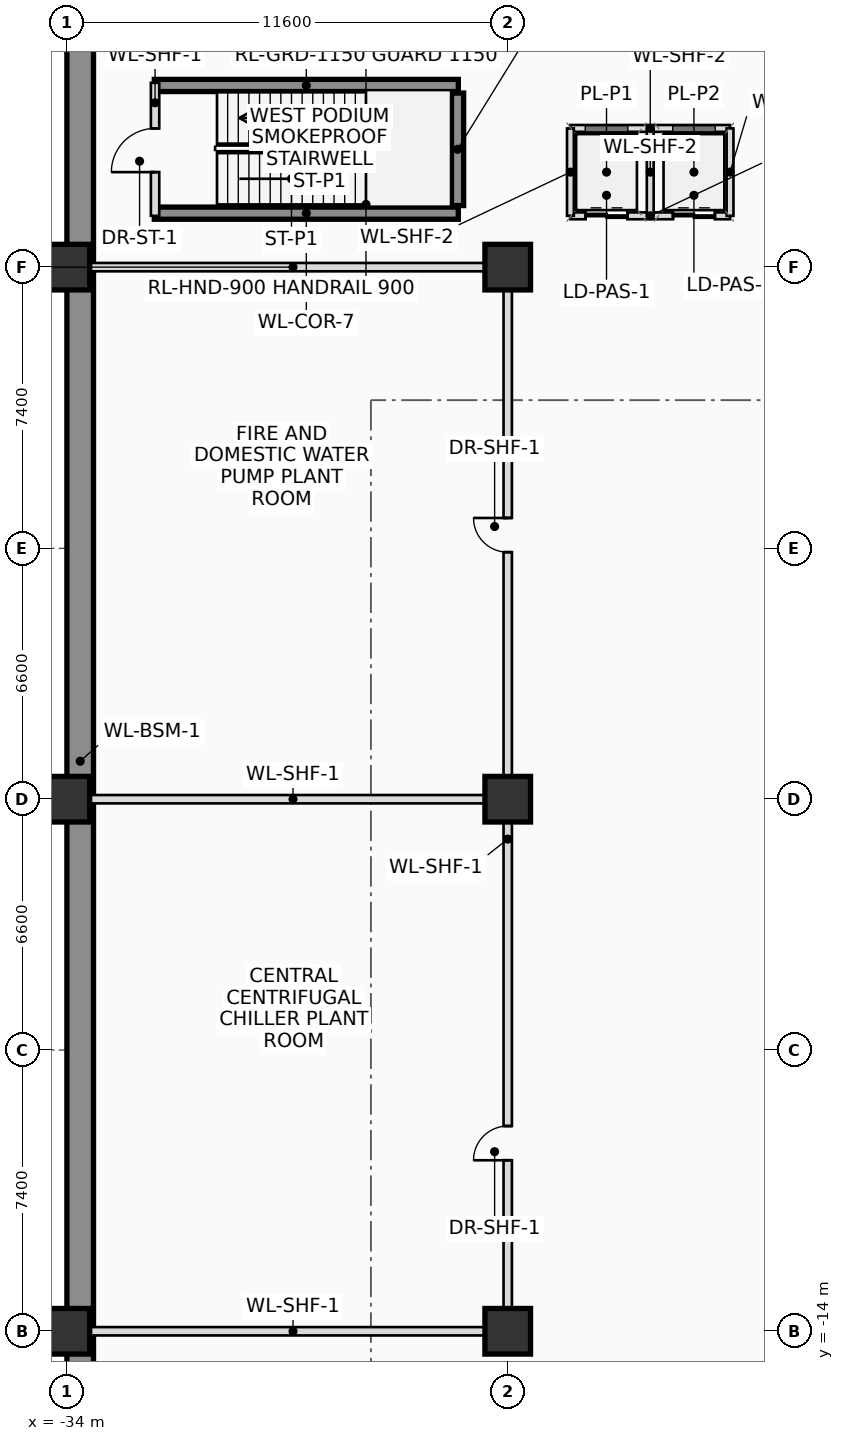
"""IFC4 building model, lengths in metres.
Left out: names, types, materials, properties, quantities, classifications, styles, units other than length and angle.
Written with IfcOpenShell. Run it as: python <this file> out.ifc"""

import sys

from ifc_helpers import new_model, si_unit, direction, frame, frame_2d, origin, origin_2d, place, context, subcontext, project, spatial, rectangle, extrude, source, transform, mapped, element, fill, save


model = new_model("IFC4")
c1 = context("Model", 3, precision=1e-05, world=origin(), true_north=direction((0.0, 1.0)))
c2 = subcontext(c1, "Body", "Model", "MODEL_VIEW")
j1 = project(units=[si_unit("LENGTHUNIT", "METRE"), si_unit("PLANEANGLEUNIT", "RADIAN")], contexts=[c1])
p1 = place(None, origin())
s1 = spatial("IfcSite", under=j1, at=p1, CompositionType="ELEMENT")
p2 = place(p1, origin())
s2 = spatial("IfcBuilding", under=s1, at=p2, CompositionType="ELEMENT")
p3 = place(p2, frame((0.0, 0.0, -9.6)))
s3 = spatial("IfcBuildingStorey", under=s2, at=p3, CompositionType="ELEMENT", Elevation=-9.6)
for number, where, z_axis, x_axis in (
    (1, (-31.7, 18.78, 0.0), (0.0, 0.0, 1.0), (1.0, 0.0, 0.0)),
    (2, (-31.7, 15.42, 0.0), (0.0, 0.0, 1.0), (1.0, 0.0, 0.0)),
):
    element("IfcWall", number, at=place(p3, frame(where, z_axis=z_axis, x_axis=x_axis)), inside=s3, PredefinedType="SHEAR", context=c2, shape_type="SweptSolid", body=[
        extrude(rectangle(XDim=8.0, YDim=0.32, at=frame_2d((4.0, 0.0))), origin(), (0.0, 0.0, 1.0), 4.8),
    ])
p4 = place(p3, frame((-23.72, 15.62, 0.0), z_axis=(0.0, 0.0, 1.0), x_axis=(0.0, 1.0, 0.0)))
e3 = element("IfcWall", 3, at=p4, inside=s3, PredefinedType="SHEAR", context=c2, shape_type="SweptSolid", body=[
    extrude(rectangle(XDim=2.96, YDim=0.32, at=frame_2d((1.48, 0.0))), origin(), (0.0, 0.0, 1.0), 4.8),
])
p5 = place(p3, frame((-33.65, -26.8, 0.0), z_axis=(0.0, 0.0, 1.0), x_axis=(0.0, 1.0, 0.0)))
e4 = element("IfcWall", 4, at=p5, inside=s3, PredefinedType="USERDEFINED", context=c2, shape_type="SweptSolid", body=[
    extrude(rectangle(XDim=55.6, YDim=0.7, at=frame_2d((27.8, 0.0))), origin(), (0.0, 0.0, 1.0), 4.54),
])
m1 = source(origin(), c2, "Body", "SweptSolid", [
    extrude(rectangle(XDim=1.2, YDim=1.2, at=origin_2d()), origin(), (0.0, 0.0, 1.0), 4.8),
])
for number, where, z_axis, x_axis in (
    (5, (-34.0, -14.0, 0.0), (0.0, 0.0, 1.0), (1.0, 0.0, 0.0)),
    (6, (-22.4, -14.0, 0.0), (0.0, 0.0, 1.0), (1.0, 0.0, 0.0)),
    (7, (-34.0, 0.0, 0.0), (0.0, 0.0, 1.0), (1.0, 0.0, 0.0)),
    (8, (-22.4, 0.0, 0.0), (0.0, 0.0, 1.0), (1.0, 0.0, 0.0)),
    (9, (-34.0, 14.0, 0.0), (0.0, 0.0, 1.0), (1.0, 0.0, 0.0)),
    (10, (-22.4, 14.0, 0.0), (0.0, 0.0, 1.0), (1.0, 0.0, 0.0)),
):
    element("IfcColumn", number, at=place(p3, frame(where, z_axis=z_axis, x_axis=x_axis)), inside=s3, PredefinedType="COLUMN", context=c2, shape_type="MappedRepresentation", body=[
        mapped(m1, transform((0.0, 0.0, 0.0), scale=1.0)),
    ])
p6 = place(p3, frame((-31.68, 15.35, 0.0), z_axis=(0.0, 0.0, 1.0), x_axis=(0.0, 1.0, 0.0)))
e11 = element("IfcWall", 11, at=p6, inside=s3, PredefinedType="PLUMBINGWALL", context=c2, shape_type="SweptSolid", body=[
    extrude(rectangle(XDim=3.5, YDim=0.22, at=frame_2d((1.75, 0.0))), origin(), (0.0, 0.0, 1.0), 4.25),
])
p7 = place(p6, frame((1.15, 0.0, 0.0)))
e12 = element("IfcOpeningElement", 12, at=p7, cuts=e11, PredefinedType="OPENING", context=c2, shape_type="SweptSolid", body=[
    extrude(rectangle(XDim=1.15, YDim=2.15, at=frame_2d((0.575, 1.075))), frame((0.0, 0.12, 0.0), z_axis=(0.0, -1.0, 0.0), x_axis=(1.0, 0.0, 0.0)), (0.0, 0.0, 1.0), 0.24),
])
p8 = place(p3, frame((-20.75, 15.35, 0.0), z_axis=(0.0, 0.0, 1.0), x_axis=(1.0, 0.0, 0.0)))
e13 = element("IfcWall", 13, at=p8, inside=s3, PredefinedType="PLUMBINGWALL", context=c2, shape_type="SweptSolid", body=[
    extrude(rectangle(XDim=4.2, YDim=0.18, at=frame_2d((2.1, 0.0))), origin(), (0.0, 0.0, 1.0), 4.52),
])
p9 = place(p8, frame((0.4, 0.0, 0.0)))
e14 = element("IfcOpeningElement", 14, at=p9, cuts=e13, PredefinedType="OPENING", context=c2, shape_type="SweptSolid", body=[
    extrude(rectangle(XDim=1.1, YDim=2.2, at=frame_2d((0.55, 1.1))), frame((0.0, 0.1, 0.0), z_axis=(0.0, -1.0, 0.0), x_axis=(1.0, 0.0, 0.0)), (0.0, 0.0, 1.0), 0.2),
])
p10 = place(p8, frame((2.7, 0.0, 0.0)))
e15 = element("IfcOpeningElement", 15, at=p10, cuts=e13, PredefinedType="OPENING", context=c2, shape_type="SweptSolid", body=[
    extrude(rectangle(XDim=1.1, YDim=2.2, at=frame_2d((0.55, 1.1))), frame((0.0, 0.1, 0.0), z_axis=(0.0, -1.0, 0.0), x_axis=(1.0, 0.0, 0.0)), (0.0, 0.0, 1.0), 0.2),
])
p11 = place(p3, frame((-20.75, 17.65, 0.0), z_axis=(0.0, 0.0, 1.0), x_axis=(1.0, 0.0, 0.0)))
e16 = element("IfcWall", 16, at=p11, inside=s3, PredefinedType="PLUMBINGWALL", context=c2, shape_type="SweptSolid", body=[
    extrude(rectangle(XDim=4.2, YDim=0.18, at=frame_2d((2.1, 0.0))), origin(), (0.0, 0.0, 1.0), 4.52),
])
for number, where, z_axis, x_axis in (
    (17, (-20.75, 15.35, 0.0), (0.0, 0.0, 1.0), (0.0, 1.0, 0.0)),
    (18, (-18.65, 15.35, 0.0), (0.0, 0.0, 1.0), (0.0, 1.0, 0.0)),
    (19, (-16.55, 15.35, 0.0), (0.0, 0.0, 1.0), (0.0, 1.0, 0.0)),
):
    element("IfcWall", number, at=place(p3, frame(where, z_axis=z_axis, x_axis=x_axis)), inside=s3, PredefinedType="PLUMBINGWALL", context=c2, shape_type="SweptSolid", body=[
        extrude(rectangle(XDim=2.3, YDim=0.18, at=frame_2d((1.15, 0.0))), origin(), (0.0, 0.0, 1.0), 4.52),
    ])
p12 = place(p3, frame((-22.4, -14.0, 0.0), z_axis=(0.0, 0.0, 1.0), x_axis=(0.0, 1.0, 0.0)))
e20 = element("IfcWall", 20, at=p12, inside=s3, PredefinedType="PLUMBINGWALL", context=c2, shape_type="SweptSolid", body=[
    extrude(rectangle(XDim=28.0, YDim=0.22, at=frame_2d((14.0, 0.0))), origin(), (0.0, 0.0, 1.0), 3.725),
])
p13 = place(p12, frame((4.5, 0.0, 0.0)))
e21 = element("IfcOpeningElement", 21, at=p13, cuts=e20, PredefinedType="OPENING", context=c2, shape_type="SweptSolid", body=[
    extrude(rectangle(XDim=0.9, YDim=2.05, at=frame_2d((0.45, 1.025))), frame((0.0, 0.12, 0.0), z_axis=(0.0, -1.0, 0.0), x_axis=(1.0, 0.0, 0.0)), (0.0, 0.0, 1.0), 0.24),
])
p14 = place(p12, frame((20.5, 0.0, 0.0)))
e22 = element("IfcOpeningElement", 22, at=p14, cuts=e20, PredefinedType="OPENING", context=c2, shape_type="SweptSolid", body=[
    extrude(rectangle(XDim=0.9, YDim=2.05, at=frame_2d((0.45, 1.025))), frame((0.0, 0.12, 0.0), z_axis=(0.0, -1.0, 0.0), x_axis=(1.0, 0.0, 0.0)), (0.0, 0.0, 1.0), 0.24),
])
for number, where, z_axis, x_axis in (
    (23, (-33.7, 14.0, 0.0), (0.0, 0.0, 1.0), (1.0, 0.0, 0.0)),
    (24, (-33.7, -14.0, 0.0), (0.0, 0.0, 1.0), (1.0, 0.0, 0.0)),
    (25, (-33.7, 0.0, 0.0), (0.0, 0.0, 1.0), (1.0, 0.0, 0.0)),
):
    element("IfcWall", number, at=place(p3, frame(where, z_axis=z_axis, x_axis=x_axis)), inside=s3, PredefinedType="PLUMBINGWALL", context=c2, shape_type="SweptSolid", body=[
        extrude(rectangle(XDim=11.3, YDim=0.22, at=frame_2d((5.65, 0.0))), origin(), (0.0, 0.0, 1.0), 3.725),
    ])
p15 = place(p7, origin())
e26 = element("IfcDoor", 26, at=p15, inside=s3, OperationType="SINGLE_SWING_LEFT", PredefinedType="DOOR", context=c2, shape_type="SweptSolid", body=[
    extrude(rectangle(XDim=1.15, YDim=2.15, at=frame_2d((0.575, 1.075))), frame((0.0, 0.025, 0.0), z_axis=(0.0, -1.0, 0.0), x_axis=(1.0, 0.0, 0.0)), (0.0, 0.0, 1.0), 0.05),
])
fill(e12, e26)
p16 = place(p9, origin())
e27 = element("IfcDoor", 27, at=p16, inside=s3, OperationType="DOUBLE_DOOR_SLIDING", PredefinedType="DOOR", context=c2, shape_type="SweptSolid", body=[
    extrude(rectangle(XDim=1.1, YDim=2.2, at=frame_2d((0.55, 1.1))), frame((0.0, 0.025, 0.0), z_axis=(0.0, -1.0, 0.0), x_axis=(1.0, 0.0, 0.0)), (0.0, 0.0, 1.0), 0.05),
])
fill(e14, e27)
p17 = place(p10, origin())
e28 = element("IfcDoor", 28, at=p17, inside=s3, OperationType="DOUBLE_DOOR_SLIDING", PredefinedType="DOOR", context=c2, shape_type="SweptSolid", body=[
    extrude(rectangle(XDim=1.1, YDim=2.2, at=frame_2d((0.55, 1.1))), frame((0.0, 0.025, 0.0), z_axis=(0.0, -1.0, 0.0), x_axis=(1.0, 0.0, 0.0)), (0.0, 0.0, 1.0), 0.05),
])
fill(e15, e28)
p18 = place(p13, origin())
e29 = element("IfcDoor", 29, at=p18, inside=s3, OperationType="SINGLE_SWING_LEFT", PredefinedType="DOOR", context=c2, shape_type="SweptSolid", body=[
    extrude(rectangle(XDim=0.9, YDim=2.05, at=frame_2d((0.45, 1.025))), frame((0.0, 0.025, 0.0), z_axis=(0.0, -1.0, 0.0), x_axis=(1.0, 0.0, 0.0)), (0.0, 0.0, 1.0), 0.05),
])
fill(e21, e29)
p19 = place(p14, origin())
e30 = element("IfcDoor", 30, at=p19, inside=s3, OperationType="SINGLE_SWING_RIGHT", PredefinedType="DOOR", context=c2, shape_type="SweptSolid", body=[
    extrude(rectangle(XDim=0.9, YDim=2.05, at=frame_2d((0.45, 1.025))), frame((0.0, 0.025, 0.0), z_axis=(0.0, -1.0, 0.0), x_axis=(1.0, 0.0, 0.0)), (0.0, 0.0, 1.0), 0.05),
])
fill(e22, e30)
save(model, sys.argv[1])
